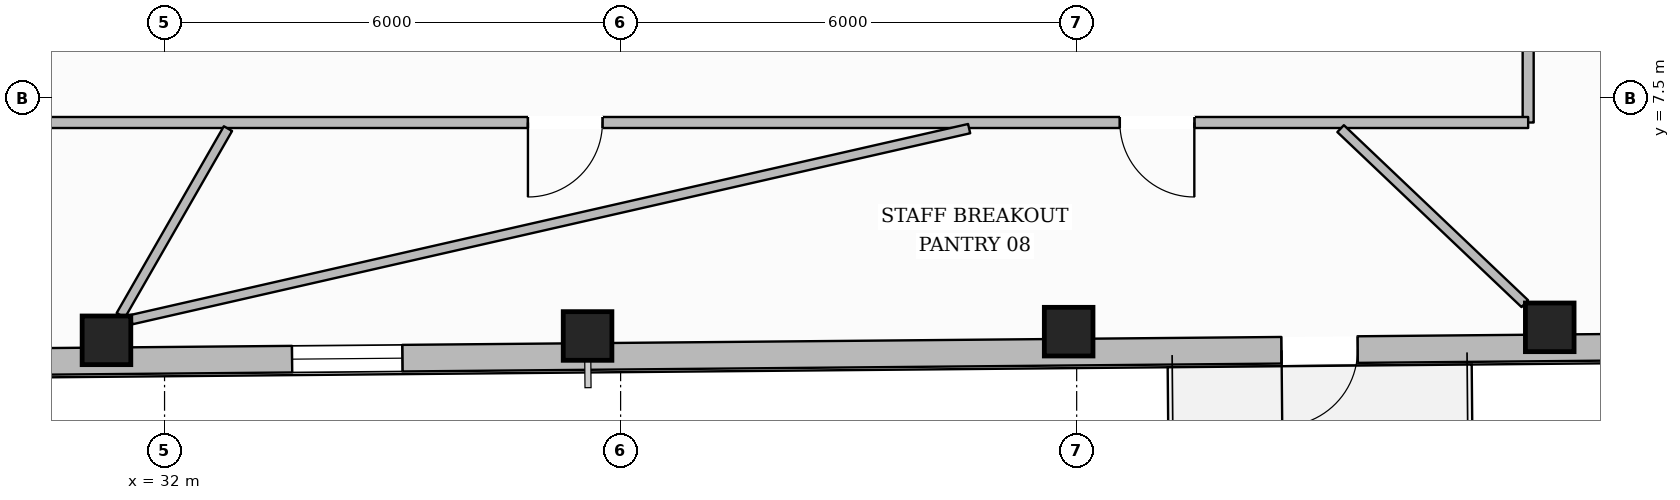
"""IFC4 building model, lengths in metres.
Left out: names, types, materials, properties, quantities, classifications, styles, units other than length and angle.
Written with IfcOpenShell. Run it as: python <this file> out.ifc"""

import sys

from ifc_helpers import new_model, si_unit, direction, frame, frame_2d, origin, origin_2d, place, context, subcontext, project, spatial, rectangle, hollow_rectangle, extrude, element, fill, save


model = new_model("IFC4")
c1 = context("Model", 3, precision=1e-05, world=origin(), true_north=direction((0.0, 1.0)))
c2 = subcontext(c1, "Body", "Model", "MODEL_VIEW")
j1 = project(units=[si_unit("LENGTHUNIT", "METRE"), si_unit("PLANEANGLEUNIT", "RADIAN")], contexts=[c1])
p1 = place(None, origin())
s1 = spatial("IfcSite", under=j1, at=p1, CompositionType="ELEMENT")
p2 = place(p1, origin())
s2 = spatial("IfcBuilding", under=s1, at=p2, CompositionType="ELEMENT")
p3 = place(p2, frame((0.0, 0.0, 215.05)))
s3 = spatial("IfcBuildingStorey", under=s2, at=p3, CompositionType="ELEMENT", Elevation=215.05)
for number, where, z_axis, x_axis in (
    (1, (31.236, 4.314, 0.0), (0.0, 0.0, 1.0), (1.0, 0.0, 0.0)),
    (2, (37.565, 4.372, 0.0), (0.0, 0.0, 1.0), (1.0, 0.0, 0.0)),
    (3, (43.895, 4.428, 0.0), (0.0, 0.0, 1.0), (1.0, 0.0, 0.0)),
    (4, (50.224, 4.485, 0.0), (0.0, 0.0, 1.0), (1.0, 0.0, 0.0)),
):
    element("IfcColumn", number, at=place(p3, frame(where, z_axis=z_axis, x_axis=x_axis)), inside=s3, PredefinedType="COLUMN", context=c2, shape_type="SweptSolid", body=[
        extrude(hollow_rectangle(XDim=0.64, YDim=0.64, WallThickness=0.028, at=origin_2d()), origin(), (0.0, 0.0, 1.0), 3.6),
    ])
p4 = place(p3, frame((57.027, 4.277, 0.0), z_axis=(0.0, 0.0, 1.0), x_axis=(-0.999959560683, -0.008993163978, 0.0)))
e5 = element("IfcWall", 5, at=p4, inside=s3, PredefinedType="STANDARD", context=c2, shape_type="SweptSolid", body=[
    extrude(rectangle(XDim=38.929, YDim=0.35, at=frame_2d((19.465, 0.0))), origin(), (0.0, 0.0, 1.0), 3.132),
])
p5 = place(p4, frame((9.332, 0.0, 0.0)))
e6 = element("IfcOpeningElement", 6, at=p5, cuts=e5, PredefinedType="OPENING", context=c2, shape_type="SweptSolid", body=[
    extrude(rectangle(XDim=1.0, YDim=2.2, at=frame_2d((0.5, 1.1))), frame((0.0, 0.185, 0.0), z_axis=(0.0, -1.0, 0.0), x_axis=(1.0, 0.0, 0.0)), (0.0, 0.0, 1.0), 0.37),
])
p6 = place(p4, frame((34.559, 0.0, 0.65)))
e7 = element("IfcOpeningElement", 7, at=p6, cuts=e5, PredefinedType="OPENING", context=c2, shape_type="SweptSolid", body=[
    extrude(rectangle(XDim=1.45, YDim=1.75, at=frame_2d((0.725, 0.875))), frame((0.0, 0.185, 0.0), z_axis=(0.0, -1.0, 0.0), x_axis=(1.0, 0.0, 0.0)), (0.0, 0.0, 1.0), 0.37),
])
p7 = place(p4, frame((28.229, 0.0, 0.65)))
e8 = element("IfcOpeningElement", 8, at=p7, cuts=e5, PredefinedType="OPENING", context=c2, shape_type="SweptSolid", body=[
    extrude(rectangle(XDim=1.45, YDim=1.75, at=frame_2d((0.725, 0.875))), frame((0.0, 0.185, 0.0), z_axis=(0.0, -1.0, 0.0), x_axis=(1.0, 0.0, 0.0)), (0.0, 0.0, 1.0), 0.37),
])
p8 = place(p4, frame((21.9, 0.0, 0.65)))
e9 = element("IfcOpeningElement", 9, at=p8, cuts=e5, PredefinedType="OPENING", context=c2, shape_type="SweptSolid", body=[
    extrude(rectangle(XDim=1.45, YDim=1.75, at=frame_2d((0.725, 0.875))), frame((0.0, 0.185, 0.0), z_axis=(0.0, -1.0, 0.0), x_axis=(1.0, 0.0, 0.0)), (0.0, 0.0, 1.0), 0.37),
])
p9 = place(p4, frame((2.912, 0.0, 0.65)))
e10 = element("IfcOpeningElement", 10, at=p9, cuts=e5, PredefinedType="OPENING", context=c2, shape_type="SweptSolid", body=[
    extrude(rectangle(XDim=1.45, YDim=1.75, at=frame_2d((0.725, 0.875))), frame((0.0, 0.185, 0.0), z_axis=(0.0, -1.0, 0.0), x_axis=(1.0, 0.0, 0.0)), (0.0, 0.0, 1.0), 0.37),
])
p10 = place(p3, frame((49.94, 15.1, 0.0), z_axis=(0.0, 0.0, 1.0), x_axis=(0.0, -1.0, 0.0)))
e11 = element("IfcWall", 11, at=p10, inside=s3, PredefinedType="PARTITIONING", context=c2, shape_type="SweptSolid", body=[
    extrude(rectangle(XDim=7.92, YDim=0.145, at=frame_2d((3.96, 0.0))), origin(), (0.0, 0.0, 1.0), 3.6),
])
p11 = place(p10, frame((3.26, 0.0, 0.0)))
e12 = element("IfcOpeningElement", 12, at=p11, cuts=e11, PredefinedType="OPENING", context=c2, shape_type="SweptSolid", body=[
    extrude(rectangle(XDim=1.4, YDim=2.2, at=frame_2d((0.7, 1.1))), frame((0.0, 0.083, 0.0), z_axis=(0.0, -1.0, 0.0), x_axis=(1.0, 0.0, 0.0)), (0.0, 0.0, 1.0), 0.165),
])
p12 = place(p3, frame((49.94, 7.18, 0.0), z_axis=(0.0, 0.0, 1.0), x_axis=(-1.0, 0.0, 0.0)))
e13 = element("IfcWall", 13, at=p12, inside=s3, PredefinedType="PARTITIONING", context=c2, shape_type="SweptSolid", body=[
    extrude(rectangle(XDim=23.88, YDim=0.145, at=frame_2d((11.94, 0.0))), origin(), (0.0, 0.0, 1.0), 3.6),
])
p13 = place(p12, frame((20.119, 0.0, 0.0)))
e14 = element("IfcOpeningElement", 14, at=p13, cuts=e13, PredefinedType="OPENING", context=c2, shape_type="SweptSolid", body=[
    extrude(rectangle(XDim=0.98, YDim=2.15, at=frame_2d((0.49, 1.075))), frame((0.0, 0.083, 0.0), z_axis=(0.0, -1.0, 0.0), x_axis=(1.0, 0.0, 0.0)), (0.0, 0.0, 1.0), 0.165),
])
p14 = place(p12, frame((12.179, 0.0, 0.0)))
e15 = element("IfcOpeningElement", 15, at=p14, cuts=e13, PredefinedType="OPENING", context=c2, shape_type="SweptSolid", body=[
    extrude(rectangle(XDim=0.98, YDim=2.15, at=frame_2d((0.49, 1.075))), frame((0.0, 0.083, 0.0), z_axis=(0.0, -1.0, 0.0), x_axis=(1.0, 0.0, 0.0)), (0.0, 0.0, 1.0), 0.165),
])
p15 = place(p12, frame((4.392, 0.0, 0.0)))
e16 = element("IfcOpeningElement", 16, at=p15, cuts=e13, PredefinedType="OPENING", context=c2, shape_type="SweptSolid", body=[
    extrude(rectangle(XDim=0.98, YDim=2.15, at=frame_2d((0.49, 1.075))), frame((0.0, 0.083, 0.0), z_axis=(0.0, -1.0, 0.0), x_axis=(1.0, 0.0, 0.0)), (0.0, 0.0, 1.0), 0.165),
])
p16 = place(p3, frame((32.834, 7.1, 0.0), z_axis=(0.0, 0.0, 1.0), x_axis=(-0.497706658822, -0.867345422404, 0.0)))
e17 = element("IfcWall", 17, at=p16, inside=s3, PredefinedType="PARTITIONING", context=c2, shape_type="SweptSolid", body=[
    extrude(rectangle(XDim=2.833, YDim=0.125, at=frame_2d((1.417, 0.0))), origin(), (0.0, 0.0, 1.0), 3.6),
])
p17 = place(p3, frame((47.472, 7.1, 0.0), z_axis=(0.0, 0.0, 1.0), x_axis=(0.724915551791, -0.688837747783, 0.0)))
e18 = element("IfcWall", 18, at=p17, inside=s3, PredefinedType="PARTITIONING", context=c2, shape_type="SweptSolid", body=[
    extrude(rectangle(XDim=3.343, YDim=0.125, at=frame_2d((1.671, 0.0))), origin(), (0.0, 0.0, 1.0), 3.6),
])
p18 = place(p3, frame((31.564, 4.586, 0.0), z_axis=(0.0, 0.0, 1.0), x_axis=(0.97496923537, 0.222339807685, 0.0)))
e19 = element("IfcWall", 19, at=p18, inside=s3, PredefinedType="PARTITIONING", context=c2, shape_type="SweptSolid", body=[
    extrude(rectangle(XDim=11.304, YDim=0.125, at=frame_2d((5.652, 0.0))), origin(), (0.0, 0.0, 1.0), 3.339),
])
p19 = place(p5, origin())
e20 = element("IfcDoor", 20, at=p19, inside=s3, OperationType="SINGLE_SWING_RIGHT", PredefinedType="DOOR", context=c2, shape_type="SweptSolid", body=[
    extrude(rectangle(XDim=1.0, YDim=2.2, at=frame_2d((0.5, 1.1))), frame((0.0, 0.025, 0.0), z_axis=(0.0, -1.0, 0.0), x_axis=(1.0, 0.0, 0.0)), (0.0, 0.0, 1.0), 0.05),
])
fill(e6, e20)
p20 = place(p8, origin())
e21 = element("IfcWindow", 21, at=p20, inside=s3, PartitioningType="SINGLE_PANEL", PredefinedType="WINDOW", context=c2, shape_type="SweptSolid", body=[
    extrude(rectangle(XDim=1.45, YDim=1.75, at=frame_2d((0.725, 0.875))), frame((0.0, 0.03, 0.0), z_axis=(0.0, -1.0, 0.0), x_axis=(1.0, 0.0, 0.0)), (0.0, 0.0, 1.0), 0.06),
])
fill(e9, e21)
p21 = place(p14, origin())
e22 = element("IfcDoor", 22, at=p21, inside=s3, OperationType="SINGLE_SWING_RIGHT", PredefinedType="DOOR", context=c2, shape_type="SweptSolid", body=[
    extrude(rectangle(XDim=0.98, YDim=2.15, at=frame_2d((0.49, 1.075))), frame((0.0, 0.025, 0.0), z_axis=(0.0, -1.0, 0.0), x_axis=(1.0, 0.0, 0.0)), (0.0, 0.0, 1.0), 0.05),
])
fill(e15, e22)
p22 = place(p15, origin())
e23 = element("IfcDoor", 23, at=p22, inside=s3, OperationType="SINGLE_SWING_LEFT", PredefinedType="DOOR", context=c2, shape_type="SweptSolid", body=[
    extrude(rectangle(XDim=0.98, YDim=2.15, at=frame_2d((0.49, 1.075))), frame((0.0, 0.025, 0.0), z_axis=(0.0, -1.0, 0.0), x_axis=(1.0, 0.0, 0.0)), (0.0, 0.0, 1.0), 0.05),
])
fill(e16, e23)
save(model, sys.argv[1])
